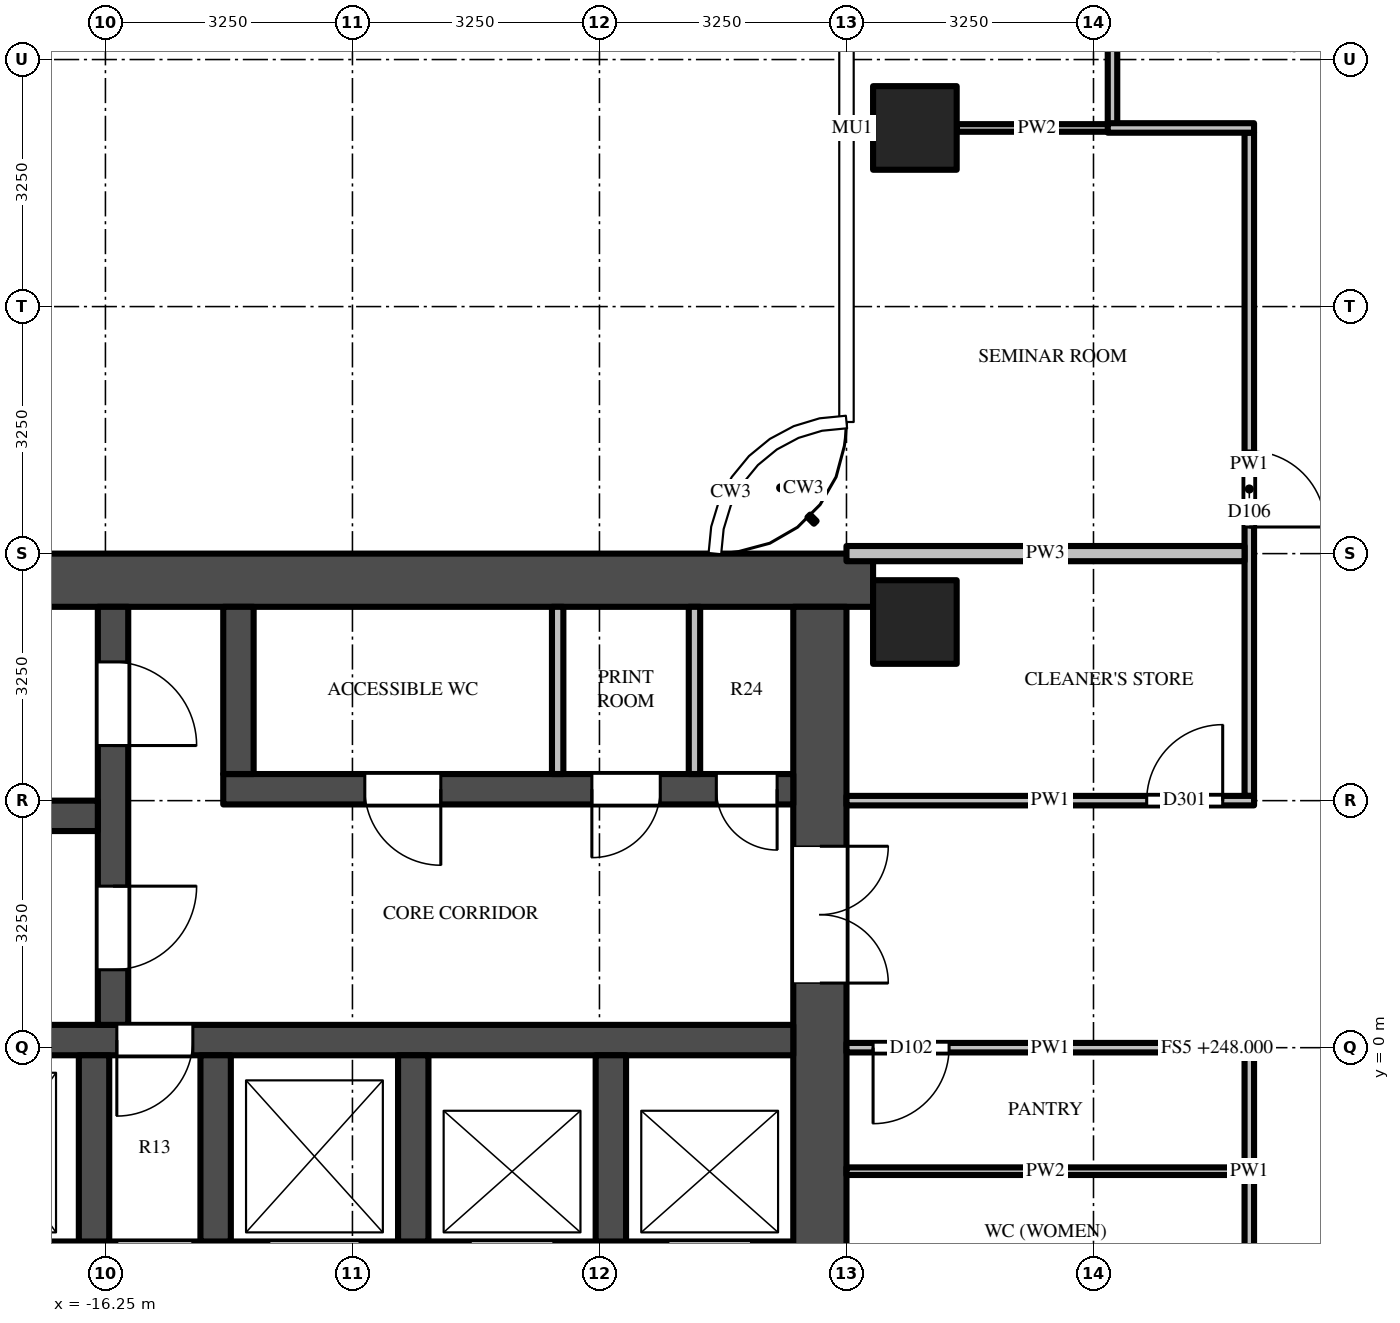
"""IFC4 building model, lengths in metres.
Left out: names, types, materials, properties, quantities, classifications, styles, units other than length and angle.
Written with IfcOpenShell. Run it as: python <this file> out.ifc"""

import sys

from ifc_helpers import new_model, si_unit, direction, frame, frame_2d, origin, origin_2d, place, context, subcontext, project, spatial, rectangle, extrude, source, transform, mapped, element, fill, save


model = new_model("IFC4")
c1 = context("Model", 3, precision=1e-05, world=origin(), true_north=direction((0.0, 1.0)))
c2 = subcontext(c1, "Body", "Model", "MODEL_VIEW")
j1 = project(units=[si_unit("LENGTHUNIT", "METRE"), si_unit("PLANEANGLEUNIT", "RADIAN")], contexts=[c1])
p1 = place(None, origin())
s1 = spatial("IfcSite", under=j1, at=p1, CompositionType="ELEMENT")
p2 = place(p1, origin())
s2 = spatial("IfcBuilding", under=s1, at=p2, CompositionType="ELEMENT")
p3 = place(p2, frame((0.0, 0.0, 248.0)))
s3 = spatial("IfcBuildingStorey", under=s2, at=p3, CompositionType="ELEMENT", Elevation=248.0)
m1 = source(origin(), c2, "Body", "SweptSolid", [
    extrude(rectangle(XDim=1.1, YDim=1.1, at=origin_2d()), origin(), (0.0, 0.0, 1.0), 3.9),
])
for number, where, z_axis, x_axis in (
    (1, (-5.6, 12.1, 0.0), (0.0, 0.0, 1.0), (1.0, 0.0, 0.0)),
    (2, (-5.6, 5.6, 0.0), (0.0, 0.0, 1.0), (1.0, 0.0, 0.0)),
):
    element("IfcColumn", number, at=place(p3, frame(where, z_axis=z_axis, x_axis=x_axis)), inside=s3, PredefinedType="COLUMN", context=c2, shape_type="MappedRepresentation", body=[
        mapped(m1, transform((0.0, 0.0, 0.0))),
    ])
m2 = source(origin(), c2, "Body", "SweptSolid", [
    extrude(rectangle(XDim=16.6, YDim=0.7, at=frame_2d((8.3, 0.0))), origin(), (0.0, 0.0, 1.0), 3.7),
])
p4 = place(p3, frame((-6.15, 6.15, 0.0), z_axis=(0.0, 0.0, 1.0), x_axis=(-1.0, 0.0, 0.0)))
e3 = element("IfcWall", 3, at=p4, inside=s3, PredefinedType="SHEAR", context=c2, shape_type="MappedRepresentation", body=[
    mapped(m2, transform((0.0, 0.0, 0.0))),
])
m3 = source(origin(), c2, "Body", "SweptSolid", [
    extrude(rectangle(XDim=14.85, YDim=0.7, at=frame_2d((7.425, 0.0))), origin(), (0.0, 0.0, 1.0), 3.7),
])
p5 = place(p3, frame((-7.2, -2.9, 0.0), z_axis=(0.0, 0.0, 1.0), x_axis=(-1.0, 0.0, 0.0)))
e4 = element("IfcWall", 4, at=p5, inside=s3, PredefinedType="SHEAR", context=c2, shape_type="MappedRepresentation", body=[
    mapped(m3, transform((0.0, 0.0, 0.0))),
])
m4 = source(origin(), c2, "Body", "SweptSolid", [
    extrude(rectangle(XDim=1.1, YDim=2.1, at=frame_2d((0.55, 1.05))), frame((0.0, 0.36, 0.0), z_axis=(0.0, -1.0, 0.0), x_axis=(1.0, 0.0, 0.0)), (0.0, 0.0, 1.0), 0.72),
])
p6 = place(p5, frame((0.55, 0.0, 0.0)))
e5 = element("IfcOpeningElement", 5, at=p6, cuts=e4, PredefinedType="OPENING", context=c2, shape_type="MappedRepresentation", body=[
    mapped(m4, transform((0.0, 0.0, 0.0))),
])
p7 = place(p5, frame((3.15, 0.0, 0.0)))
e6 = element("IfcOpeningElement", 6, at=p7, cuts=e4, PredefinedType="OPENING", context=c2, shape_type="MappedRepresentation", body=[
    mapped(m4, transform((0.0, 0.0, 0.0))),
])
m5 = source(origin(), c2, "Body", "SweptSolid", [
    extrude(rectangle(XDim=1.2, YDim=2.1, at=frame_2d((0.6, 1.05))), frame((0.0, 0.36, 0.0), z_axis=(0.0, -1.0, 0.0), x_axis=(1.0, 0.0, 0.0)), (0.0, 0.0, 1.0), 0.72),
])
p8 = place(p5, frame((5.7, 0.0, 0.0)))
e7 = element("IfcOpeningElement", 7, at=p8, cuts=e4, PredefinedType="OPENING", context=c2, shape_type="MappedRepresentation", body=[
    mapped(m5, transform((0.0, 0.0, 0.0))),
])
m6 = source(origin(), c2, "Body", "SweptSolid", [
    extrude(rectangle(XDim=1.3, YDim=2.1, at=frame_2d((0.65, 1.05))), frame((0.0, 0.36, 0.0), z_axis=(0.0, -1.0, 0.0), x_axis=(1.0, 0.0, 0.0)), (0.0, 0.0, 1.0), 0.72),
])
p9 = place(p5, frame((12.2, 0.0, 0.0)))
e8 = element("IfcOpeningElement", 8, at=p9, cuts=e4, PredefinedType="OPENING", context=c2, shape_type="MappedRepresentation", body=[
    mapped(m6, transform((0.0, 0.0, 0.0))),
])
p10 = place(p5, frame((9.85, 0.0, 0.0)))
e9 = element("IfcOpeningElement", 9, at=p10, cuts=e4, PredefinedType="OPENING", context=c2, shape_type="MappedRepresentation", body=[
    mapped(m5, transform((0.0, 0.0, 0.0))),
])
m7 = source(origin(), c2, "Body", "SweptSolid", [
    extrude(rectangle(XDim=1.0, YDim=2.1, at=frame_2d((0.5, 1.05))), frame((0.0, 0.36, 0.0), z_axis=(0.0, -1.0, 0.0), x_axis=(1.0, 0.0, 0.0)), (0.0, 0.0, 1.0), 0.72),
])
p11 = place(p5, frame((7.9, 0.0, 0.0)))
e10 = element("IfcOpeningElement", 10, at=p11, cuts=e4, PredefinedType="OPENING", context=c2, shape_type="MappedRepresentation", body=[
    mapped(m7, transform((0.0, 0.0, 0.0))),
])
m8 = source(origin(), c2, "Body", "SweptSolid", [
    extrude(rectangle(XDim=9.05, YDim=0.7, at=frame_2d((4.525, 0.0))), origin(), (0.0, 0.0, 1.0), 3.7),
])
p12 = place(p3, frame((-6.85, 5.8, 0.0), z_axis=(0.0, 0.0, 1.0), x_axis=(0.0, -1.0, 0.0)))
e11 = element("IfcWall", 11, at=p12, inside=s3, PredefinedType="SHEAR", context=c2, shape_type="MappedRepresentation", body=[
    mapped(m8, transform((0.0, 0.0, 0.0))),
])
m9 = source(origin(), c2, "Body", "SweptSolid", [
    extrude(rectangle(XDim=1.8, YDim=2.1, at=frame_2d((0.9, 1.05))), frame((0.0, 0.36, 0.0), z_axis=(0.0, -1.0, 0.0), x_axis=(1.0, 0.0, 0.0)), (0.0, 0.0, 1.0), 0.72),
])
p13 = place(p12, frame((3.15, 0.0, 0.0)))
e12 = element("IfcOpeningElement", 12, at=p13, cuts=e11, PredefinedType="OPENING", context=c2, shape_type="MappedRepresentation", body=[
    mapped(m9, transform((0.0, 0.0, 0.0))),
])
m10 = source(origin(), c2, "Body", "SweptSolid", [
    extrude(rectangle(XDim=7.5, YDim=0.4, at=frame_2d((3.75, 0.0))), origin(), (0.0, 0.0, 1.0), 3.7),
])
p14 = place(p3, frame((-7.2, 3.4, 0.0), z_axis=(0.0, 0.0, 1.0), x_axis=(-1.0, 0.0, 0.0)))
e13 = element("IfcWall", 13, at=p14, inside=s3, PredefinedType="SHEAR", context=c2, shape_type="MappedRepresentation", body=[
    mapped(m10, transform((0.0, 0.0, 0.0))),
])
m11 = source(origin(), c2, "Body", "SweptSolid", [
    extrude(rectangle(XDim=0.8, YDim=2.1, at=frame_2d((0.4, 1.05))), frame((0.0, 0.21, 0.0), z_axis=(0.0, -1.0, 0.0), x_axis=(1.0, 0.0, 0.0)), (0.0, 0.0, 1.0), 0.42),
])
p15 = place(p14, frame((0.212, 0.0, 0.0)))
e14 = element("IfcOpeningElement", 14, at=p15, cuts=e13, PredefinedType="OPENING", context=c2, shape_type="MappedRepresentation", body=[
    mapped(m11, transform((0.0, 0.0, 0.0))),
])
m12 = source(origin(), c2, "Body", "SweptSolid", [
    extrude(rectangle(XDim=0.9, YDim=2.1, at=frame_2d((0.45, 1.05))), frame((0.0, 0.21, 0.0), z_axis=(0.0, -1.0, 0.0), x_axis=(1.0, 0.0, 0.0)), (0.0, 0.0, 1.0), 0.42),
])
p16 = place(p14, frame((1.75, 0.0, 0.0)))
e15 = element("IfcOpeningElement", 15, at=p16, cuts=e13, PredefinedType="OPENING", context=c2, shape_type="MappedRepresentation", body=[
    mapped(m12, transform((0.0, 0.0, 0.0))),
])
m13 = source(origin(), c2, "Body", "SweptSolid", [
    extrude(rectangle(XDim=1.0, YDim=2.1, at=frame_2d((0.5, 1.05))), frame((0.0, 0.21, 0.0), z_axis=(0.0, -1.0, 0.0), x_axis=(1.0, 0.0, 0.0)), (0.0, 0.0, 1.0), 0.42),
])
p17 = place(p14, frame((4.637, 0.0, 0.0)))
e16 = element("IfcOpeningElement", 16, at=p17, cuts=e13, PredefinedType="OPENING", context=c2, shape_type="MappedRepresentation", body=[
    mapped(m13, transform((0.0, 0.0, 0.0))),
])
m14 = source(origin(), c2, "Body", "SweptSolid", [
    extrude(rectangle(XDim=14.85, YDim=0.4, at=frame_2d((7.425, 0.0))), origin(), (0.0, 0.0, 1.0), 3.7),
])
p18 = place(p3, frame((-7.2, 0.1, 0.0), z_axis=(0.0, 0.0, 1.0), x_axis=(-1.0, 0.0, 0.0)))
e17 = element("IfcWall", 17, at=p18, inside=s3, PredefinedType="SHEAR", context=c2, shape_type="MappedRepresentation", body=[
    mapped(m14, transform((0.0, 0.0, 0.0))),
])
p19 = place(p18, frame((7.9, 0.0, 0.0)))
e18 = element("IfcOpeningElement", 18, at=p19, cuts=e17, PredefinedType="OPENING", context=c2, shape_type="MappedRepresentation", body=[
    mapped(m13, transform((0.0, 0.0, 0.0))),
])
m15 = source(origin(), c2, "Body", "SweptSolid", [
    extrude(rectangle(XDim=5.5, YDim=0.4, at=frame_2d((2.75, 0.0))), origin(), (0.0, 0.0, 1.0), 3.7),
])
p20 = place(p3, frame((-16.15, 5.8, 0.0), z_axis=(0.0, 0.0, 1.0), x_axis=(0.0, -1.0, 0.0)))
e19 = element("IfcWall", 19, at=p20, inside=s3, PredefinedType="SHEAR", context=c2, shape_type="MappedRepresentation", body=[
    mapped(m15, transform((0.0, 0.0, 0.0))),
])
m16 = source(origin(), c2, "Body", "SweptSolid", [
    extrude(rectangle(XDim=1.1, YDim=2.1, at=frame_2d((0.55, 1.05))), frame((0.0, 0.21, 0.0), z_axis=(0.0, -1.0, 0.0), x_axis=(1.0, 0.0, 0.0)), (0.0, 0.0, 1.0), 0.42),
])
p21 = place(p20, frame((0.725, 0.0, 0.0)))
e20 = element("IfcOpeningElement", 20, at=p21, cuts=e19, PredefinedType="OPENING", context=c2, shape_type="MappedRepresentation", body=[
    mapped(m16, transform((0.0, 0.0, 0.0))),
])
p22 = place(p20, frame((3.675, 0.0, 0.0)))
e21 = element("IfcOpeningElement", 21, at=p22, cuts=e19, PredefinedType="OPENING", context=c2, shape_type="MappedRepresentation", body=[
    mapped(m16, transform((0.0, 0.0, 0.0))),
])
m17 = source(origin(), c2, "Body", "SweptSolid", [
    extrude(rectangle(XDim=5.7, YDim=0.4, at=frame_2d((2.85, 0.0))), origin(), (0.0, 0.0, 1.0), 3.7),
])
p23 = place(p3, frame((-16.35, 3.05, 0.0), z_axis=(0.0, 0.0, 1.0), x_axis=(-1.0, 0.0, 0.0)))
e22 = element("IfcWall", 22, at=p23, inside=s3, PredefinedType="SHEAR", context=c2, shape_type="MappedRepresentation", body=[
    mapped(m17, transform((0.0, 0.0, 0.0))),
])
m18 = source(origin(), c2, "Body", "SweptSolid", [
    extrude(rectangle(XDim=2.2, YDim=0.4, at=frame_2d((1.1, 0.0))), origin(), (0.0, 0.0, 1.0), 3.7),
])
p24 = place(p3, frame((-14.5, 5.8, 0.0), z_axis=(0.0, 0.0, 1.0), x_axis=(0.0, -1.0, 0.0)))
e23 = element("IfcWall", 23, at=p24, inside=s3, PredefinedType="SHEAR", context=c2, shape_type="MappedRepresentation", body=[
    mapped(m18, transform((0.0, 0.0, 0.0))),
])
m19 = source(origin(), c2, "Body", "SweptSolid", [
    extrude(rectangle(XDim=2.45, YDim=0.4, at=frame_2d((1.225, 0.0))), origin(), (0.0, 0.0, 1.0), 3.7),
])
for number, where, z_axis, x_axis in (
    (24, (-9.6, -0.1, 0.0), (0.0, 0.0, 1.0), (0.0, -1.0, 0.0)),
    (25, (-12.2, -0.1, 0.0), (0.0, 0.0, 1.0), (0.0, -1.0, 0.0)),
    (26, (-14.8, -0.1, 0.0), (0.0, 0.0, 1.0), (0.0, -1.0, 0.0)),
    (27, (-16.4, -0.1, 0.0), (0.0, 0.0, 1.0), (0.0, -1.0, 0.0)),
):
    element("IfcWall", number, at=place(p3, frame(where, z_axis=z_axis, x_axis=x_axis)), inside=s3, PredefinedType="SHEAR", context=c2, shape_type="MappedRepresentation", body=[
        mapped(m19, transform((0.0, 0.0, 0.0))),
    ])
m20 = source(origin(), c2, "Body", "SweptSolid", [
    extrude(rectangle(XDim=2.2, YDim=0.15, at=frame_2d((1.1, 0.0))), origin(), (0.0, 0.0, 1.0), 3.7),
])
for number, where, z_axis, x_axis in (
    (28, (-8.5, 5.8, 0.0), (0.0, 0.0, 1.0), (0.0, -1.0, 0.0)),
    (29, (-10.3, 5.8, 0.0), (0.0, 0.0, 1.0), (0.0, -1.0, 0.0)),
):
    element("IfcWall", number, at=place(p3, frame(where, z_axis=z_axis, x_axis=x_axis)), inside=s3, PredefinedType="PARTITIONING", context=c2, shape_type="MappedRepresentation", body=[
        mapped(m20, transform((0.0, 0.0, 0.0))),
    ])
m21 = source(origin(), c2, "Body", "SweptSolid", [
    extrude(rectangle(XDim=8.788, YDim=0.125, at=frame_2d((4.394, 0.0))), origin(), (0.0, 0.0, 1.0), 2.78),
])
p25 = place(p3, frame((-3.0, 12.15, 0.0), z_axis=(0.0, 0.0, 1.0), x_axis=(0.0, 1.0, 0.0)))
e30 = element("IfcWall", 30, at=p25, inside=s3, PredefinedType="PARTITIONING", context=c2, shape_type="MappedRepresentation", body=[
    mapped(m21, transform((0.0, 0.0, 0.0))),
])
m22 = source(origin(), c2, "Body", "SweptSolid", [
    extrude(rectangle(XDim=1.8, YDim=2.1, at=frame_2d((0.9, 1.05))), frame((0.0, 0.073, 0.0), z_axis=(0.0, -1.0, 0.0), x_axis=(1.0, 0.0, 0.0)), (0.0, 0.0, 1.0), 0.145),
])
p26 = place(p25, frame((5.2, 0.0, 0.0)))
e31 = element("IfcOpeningElement", 31, at=p26, cuts=e30, PredefinedType="OPENING", context=c2, shape_type="MappedRepresentation", body=[
    mapped(m22, transform((0.0, 0.0, 0.0))),
])
m23 = source(origin(), c2, "Body", "SweptSolid", [
    extrude(rectangle(XDim=3.125, YDim=0.125, at=frame_2d((1.562, 0.0))), origin(), (0.0, 0.0, 1.0), 3.068),
])
p27 = place(p3, frame((-1.2, -0.062, 0.0), z_axis=(0.0, 0.0, 1.0), x_axis=(0.0, -1.0, 0.0)))
e32 = element("IfcWall", 32, at=p27, inside=s3, PredefinedType="PARTITIONING", context=c2, shape_type="MappedRepresentation", body=[
    mapped(m23, transform((0.0, 0.0, 0.0))),
])
m24 = source(origin(), c2, "Body", "SweptSolid", [
    extrude(rectangle(XDim=8.725, YDim=0.125, at=frame_2d((4.363, 0.0))), origin(), (0.0, 0.0, 1.0), 2.997),
])
p28 = place(p3, frame((-1.2, 12.038, 0.0), z_axis=(0.0, 0.0, 1.0), x_axis=(0.0, -1.0, 0.0)))
e33 = element("IfcWall", 33, at=p28, inside=s3, PredefinedType="PARTITIONING", context=c2, shape_type="MappedRepresentation", body=[
    mapped(m24, transform((0.0, 0.0, 0.0))),
])
m25 = source(origin(), c2, "Body", "SweptSolid", [
    extrude(rectangle(XDim=1.0, YDim=2.1, at=frame_2d((0.5, 1.05))), frame((0.0, 0.073, 0.0), z_axis=(0.0, -1.0, 0.0), x_axis=(1.0, 0.0, 0.0)), (0.0, 0.0, 1.0), 0.145),
])
p29 = place(p28, frame((4.188, 0.0, 0.0)))
e34 = element("IfcOpeningElement", 34, at=p29, cuts=e33, PredefinedType="OPENING", context=c2, shape_type="MappedRepresentation", body=[
    mapped(m25, transform((0.0, 0.0, 0.0))),
])
m26 = source(origin(), c2, "Body", "SweptSolid", [
    extrude(rectangle(XDim=5.238, YDim=0.1, at=frame_2d((2.619, 0.0))), origin(), (0.0, 0.0, 1.0), 2.997),
])
p30 = place(p3, frame((-6.5, -1.625, 0.0), z_axis=(0.0, 0.0, 1.0), x_axis=(1.0, 0.0, 0.0)))
e35 = element("IfcWall", 35, at=p30, inside=s3, PredefinedType="PARTITIONING", context=c2, shape_type="MappedRepresentation", body=[
    mapped(m26, transform((0.0, 0.0, 0.0))),
])
m27 = source(origin(), c2, "Body", "SweptSolid", [
    extrude(rectangle(XDim=5.363, YDim=0.125, at=frame_2d((2.681, 0.0))), origin(), (0.0, 0.0, 1.0), 2.997),
])
p31 = place(p3, frame((-1.137, 0.0, 0.0), z_axis=(0.0, 0.0, 1.0), x_axis=(-1.0, 0.0, 0.0)))
e36 = element("IfcWall", 36, at=p31, inside=s3, PredefinedType="PARTITIONING", context=c2, shape_type="MappedRepresentation", body=[
    mapped(m27, transform((0.0, 0.0, 0.0))),
])
p32 = place(p31, frame((4.012, 0.0, 0.0)))
e37 = element("IfcOpeningElement", 37, at=p32, cuts=e36, PredefinedType="OPENING", context=c2, shape_type="MappedRepresentation", body=[
    mapped(m25, transform((0.0, 0.0, 0.0))),
])
p33 = place(p3, frame((-6.5, 3.25, 0.0), z_axis=(0.0, 0.0, 1.0), x_axis=(1.0, 0.0, 0.0)))
e38 = element("IfcWall", 38, at=p33, inside=s3, PredefinedType="PARTITIONING", context=c2, shape_type="MappedRepresentation", body=[
    mapped(m27, transform((0.0, 0.0, 0.0))),
])
p34 = place(p33, frame((3.95, 0.0, 0.0)))
e39 = element("IfcOpeningElement", 39, at=p34, cuts=e38, PredefinedType="OPENING", context=c2, shape_type="MappedRepresentation", body=[
    mapped(m25, transform((0.0, 0.0, 0.0))),
])
m28 = source(origin(), c2, "Body", "SweptSolid", [
    extrude(rectangle(XDim=5.238, YDim=0.2, at=frame_2d((2.619, 0.0))), origin(), (0.0, 0.0, 1.0), 2.78),
])
p35 = place(p3, frame((-6.5, 6.5, 0.0), z_axis=(0.0, 0.0, 1.0), x_axis=(1.0, 0.0, 0.0)))
e40 = element("IfcWall", 40, at=p35, inside=s3, PredefinedType="PARTITIONING", context=c2, shape_type="MappedRepresentation", body=[
    mapped(m28, transform((0.0, 0.0, 0.0))),
])
m29 = source(origin(), c2, "Body", "SweptSolid", [
    extrude(rectangle(XDim=2.113, YDim=0.1, at=frame_2d((1.056, 0.0))), origin(), (0.0, 0.0, 1.0), 2.997),
])
p36 = place(p3, frame((-5.05, 12.1, 0.0), z_axis=(0.0, 0.0, 1.0), x_axis=(1.0, 0.0, 0.0)))
e41 = element("IfcWall", 41, at=p36, inside=s3, PredefinedType="PARTITIONING", context=c2, shape_type="MappedRepresentation", body=[
    mapped(m29, transform((0.0, 0.0, 0.0))),
])
m30 = source(origin(), c2, "Body", "SweptSolid", [
    extrude(rectangle(XDim=1.925, YDim=0.125, at=frame_2d((0.962, 0.0))), origin(), (0.0, 0.0, 1.0), 2.997),
])
p37 = place(p3, frame((-1.137, 12.1, 0.0), z_axis=(0.0, 0.0, 1.0), x_axis=(-1.0, 0.0, 0.0)))
e42 = element("IfcWall", 42, at=p37, inside=s3, PredefinedType="PARTITIONING", context=c2, shape_type="MappedRepresentation", body=[
    mapped(m30, transform((0.0, 0.0, 0.0))),
])
m31 = source(origin(), c2, "Body", "SweptSolid", [
    extrude(rectangle(XDim=1.8, YDim=2.1, at=frame_2d((0.9, 1.05))), frame((0.0, -0.275, 0.0), z_axis=(0.0, -1.0, 0.0), x_axis=(1.0, 0.0, 0.0)), (0.0, 0.0, 1.0), 0.05),
])
p38 = place(p13, origin())
e43 = element("IfcDoor", 43, at=p38, inside=s3, OperationType="DOUBLE_DOOR_SINGLE_SWING", PredefinedType="DOOR", context=c2, shape_type="MappedRepresentation", body=[
    mapped(m31, transform((0.0, 0.0, 0.0))),
])
fill(e12, e43)
m32 = source(origin(), c2, "Body", "SweptSolid", [
    extrude(rectangle(XDim=1.1, YDim=2.1, at=frame_2d((0.55, 1.05))), frame((0.0, 0.025, 0.0), z_axis=(0.0, -1.0, 0.0), x_axis=(1.0, 0.0, 0.0)), (0.0, 0.0, 1.0), 0.05),
])
p39 = place(p21, origin())
e44 = element("IfcDoor", 44, at=p39, inside=s3, OperationType="SINGLE_SWING_RIGHT", PredefinedType="DOOR", context=c2, shape_type="MappedRepresentation", body=[
    mapped(m32, transform((0.0, 0.0, 0.0))),
])
fill(e20, e44)
p40 = place(p22, origin())
e45 = element("IfcDoor", 45, at=p40, inside=s3, OperationType="SINGLE_SWING_LEFT", PredefinedType="DOOR", context=c2, shape_type="MappedRepresentation", body=[
    mapped(m32, transform((0.0, 0.0, 0.0))),
])
fill(e21, e45)
m33 = source(origin(), c2, "Body", "SweptSolid", [
    extrude(rectangle(XDim=1.0, YDim=2.1, at=frame_2d((0.5, 1.05))), frame((0.0, 0.025, 0.0), z_axis=(0.0, -1.0, 0.0), x_axis=(1.0, 0.0, 0.0)), (0.0, 0.0, 1.0), 0.05),
])
p41 = place(p19, origin())
e46 = element("IfcDoor", 46, at=p41, inside=s3, OperationType="SINGLE_SWING_RIGHT", PredefinedType="DOOR", context=c2, shape_type="MappedRepresentation", body=[
    mapped(m33, transform((0.0, 0.0, 0.0))),
])
fill(e18, e46)
m34 = source(origin(), c2, "Body", "SweptSolid", [
    extrude(rectangle(XDim=0.8, YDim=2.1, at=frame_2d((0.4, 1.05))), frame((0.0, 0.025, 0.0), z_axis=(0.0, -1.0, 0.0), x_axis=(1.0, 0.0, 0.0)), (0.0, 0.0, 1.0), 0.05),
])
p42 = place(p15, origin())
e47 = element("IfcDoor", 47, at=p42, inside=s3, OperationType="SINGLE_SWING_LEFT", PredefinedType="DOOR", context=c2, shape_type="MappedRepresentation", body=[
    mapped(m34, transform((0.0, 0.0, 0.0))),
])
fill(e14, e47)
m35 = source(origin(), c2, "Body", "SweptSolid", [
    extrude(rectangle(XDim=0.9, YDim=2.1, at=frame_2d((0.45, 1.05))), frame((0.0, 0.025, 0.0), z_axis=(0.0, -1.0, 0.0), x_axis=(1.0, 0.0, 0.0)), (0.0, 0.0, 1.0), 0.05),
])
p43 = place(p16, origin())
e48 = element("IfcDoor", 48, at=p43, inside=s3, OperationType="SINGLE_SWING_RIGHT", PredefinedType="DOOR", context=c2, shape_type="MappedRepresentation", body=[
    mapped(m35, transform((0.0, 0.0, 0.0))),
])
fill(e15, e48)
p44 = place(p17, origin())
e49 = element("IfcDoor", 49, at=p44, inside=s3, OperationType="SINGLE_SWING_LEFT", PredefinedType="DOOR", context=c2, shape_type="MappedRepresentation", body=[
    mapped(m33, transform((0.0, 0.0, 0.0))),
])
fill(e16, e49)
p45 = place(p32, origin())
e50 = element("IfcDoor", 50, at=p45, inside=s3, OperationType="SINGLE_SWING_RIGHT", PredefinedType="DOOR", context=c2, shape_type="MappedRepresentation", body=[
    mapped(m33, transform((0.0, 0.0, 0.0))),
])
fill(e37, e50)
p46 = place(p34, origin())
e51 = element("IfcDoor", 51, at=p46, inside=s3, OperationType="SINGLE_SWING_RIGHT", PredefinedType="DOOR", context=c2, shape_type="MappedRepresentation", body=[
    mapped(m33, transform((0.0, 0.0, 0.0))),
])
fill(e39, e51)
p47 = place(p29, origin())
e52 = element("IfcDoor", 52, at=p47, inside=s3, OperationType="SINGLE_SWING_RIGHT", PredefinedType="DOOR", context=c2, shape_type="MappedRepresentation", body=[
    mapped(m33, transform((0.0, 0.0, 0.0))),
])
fill(e34, e52)
save(model, sys.argv[1])
